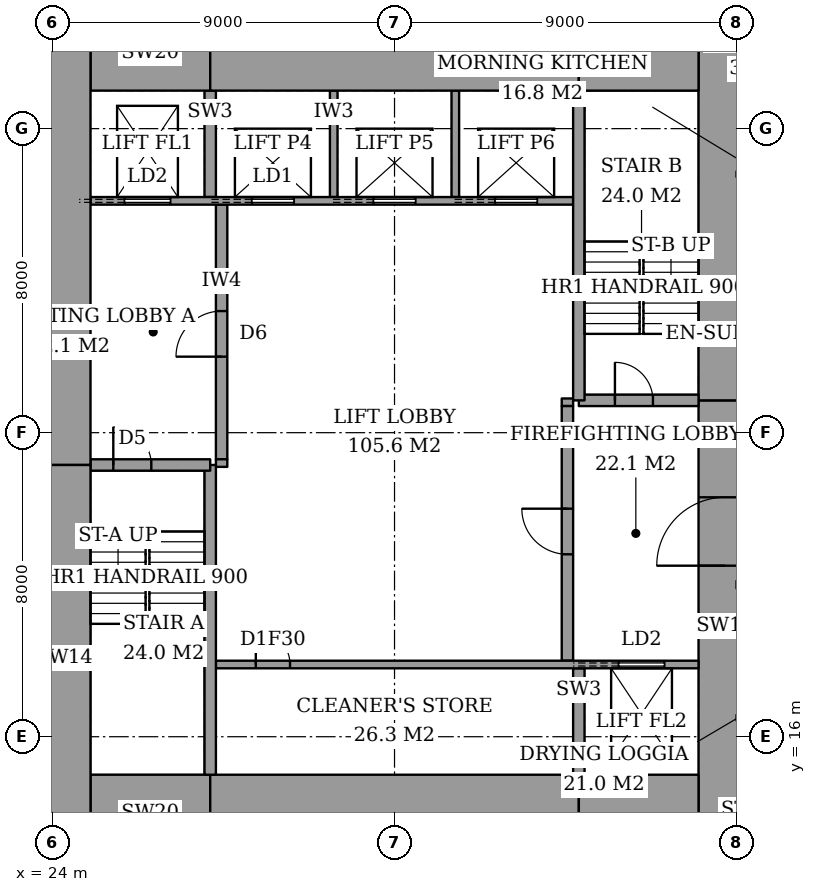
"""IFC4 building model, lengths in metres.
Left out: names, types, materials, properties, quantities, classifications, styles, units other than length and angle.
Written with IfcOpenShell. Run it as: python <this file> out.ifc"""

import sys

from ifc_helpers import new_model, si_unit, direction, frame, frame_2d, origin, place, context, subcontext, project, spatial, rectangle, extrude, element, fill, save


model = new_model("IFC4")
c1 = context("Model", 3, precision=1e-05, world=origin(), true_north=direction((0.0, 1.0)))
c2 = subcontext(c1, "Body", "Model", "MODEL_VIEW")
j1 = project(units=[si_unit("LENGTHUNIT", "METRE"), si_unit("PLANEANGLEUNIT", "RADIAN")], contexts=[c1])
p1 = place(None, origin())
s1 = spatial("IfcSite", under=j1, at=p1, CompositionType="ELEMENT")
p2 = place(p1, origin())
s2 = spatial("IfcBuilding", under=s1, at=p2, CompositionType="ELEMENT")
p3 = place(p2, frame((0.0, 0.0, 244.8)))
s3 = spatial("IfcBuildingStorey", under=s2, at=p3, CompositionType="ELEMENT", Elevation=244.8)
p4 = place(p3, frame((25.0, 14.0, 0.0), z_axis=(0.0, 0.0, 1.0), x_axis=(1.0, 0.0, 0.0)))
e1 = element("IfcWall", 1, at=p4, inside=s3, PredefinedType="SHEAR", context=c2, shape_type="SweptSolid", body=[
    extrude(rectangle(XDim=3.15, YDim=2.0, at=frame_2d((1.575, 0.0))), origin(), (0.0, 0.0, 1.0), 3.6),
])
p5 = place(p3, frame((28.15, 14.0, 0.0), z_axis=(0.0, 0.0, 1.0), x_axis=(1.0, 0.0, 0.0)))
e2 = element("IfcWall", 2, at=p5, inside=s3, PredefinedType="SHEAR", context=c2, shape_type="SweptSolid", body=[
    extrude(rectangle(XDim=9.7, YDim=2.0, at=frame_2d((4.85, 0.0))), origin(), (0.0, 0.0, 1.0), 3.6),
])
for number, where, z_axis, x_axis in (
    (3, (37.85, 14.0, 0.0), (0.0, 0.0, 1.0), (1.0, 0.0, 0.0)),
    (4, (25.0, 34.0, 0.0), (0.0, 0.0, 1.0), (1.0, 0.0, 0.0)),
):
    element("IfcWall", number, at=place(p3, frame(where, z_axis=z_axis, x_axis=x_axis)), inside=s3, PredefinedType="SHEAR", context=c2, shape_type="SweptSolid", body=[
        extrude(rectangle(XDim=3.15, YDim=2.0, at=frame_2d((1.575, 0.0))), origin(), (0.0, 0.0, 1.0), 3.6),
    ])
p6 = place(p3, frame((28.15, 34.0, 0.0), z_axis=(0.0, 0.0, 1.0), x_axis=(1.0, 0.0, 0.0)))
e5 = element("IfcWall", 5, at=p6, inside=s3, PredefinedType="SHEAR", context=c2, shape_type="SweptSolid", body=[
    extrude(rectangle(XDim=9.7, YDim=2.0, at=frame_2d((4.85, 0.0))), origin(), (0.0, 0.0, 1.0), 3.6),
])
p7 = place(p3, frame((37.85, 34.0, 0.0), z_axis=(0.0, 0.0, 1.0), x_axis=(1.0, 0.0, 0.0)))
e6 = element("IfcWall", 6, at=p7, inside=s3, PredefinedType="SHEAR", context=c2, shape_type="SweptSolid", body=[
    extrude(rectangle(XDim=3.15, YDim=2.0, at=frame_2d((1.575, 0.0))), origin(), (0.0, 0.0, 1.0), 3.6),
])
p8 = place(p3, frame((24.3, 13.0, 0.0), z_axis=(0.0, 0.0, 1.0), x_axis=(0.0, 1.0, 0.0)))
e7 = element("IfcWall", 7, at=p8, inside=s3, PredefinedType="SHEAR", context=c2, shape_type="SweptSolid", body=[
    extrude(rectangle(XDim=10.15, YDim=1.4, at=frame_2d((5.075, 0.0))), origin(), (0.0, 0.0, 1.0), 3.6),
])
p9 = place(p3, frame((24.3, 23.15, 0.0), z_axis=(0.0, 0.0, 1.0), x_axis=(0.0, 1.0, 0.0)))
e8 = element("IfcWall", 8, at=p9, inside=s3, PredefinedType="SHEAR", context=c2, shape_type="SweptSolid", body=[
    extrude(rectangle(XDim=11.85, YDim=1.4, at=frame_2d((5.925, 0.0))), origin(), (0.0, 0.0, 1.0), 3.6),
])
p10 = place(p3, frame((41.7, 13.0, 0.0), z_axis=(0.0, 0.0, 1.0), x_axis=(0.0, 1.0, 0.0)))
e9 = element("IfcWall", 9, at=p10, inside=s3, PredefinedType="SHEAR", context=c2, shape_type="SweptSolid", body=[
    extrude(rectangle(XDim=11.85, YDim=1.4, at=frame_2d((5.925, 0.0))), origin(), (0.0, 0.0, 1.0), 3.6),
])
p11 = place(p10, frame((7.5, 0.0, 0.0)))
e10 = element("IfcOpeningElement", 10, at=p11, cuts=e9, PredefinedType="OPENING", context=c2, shape_type="SweptSolid", body=[
    extrude(rectangle(XDim=1.8, YDim=2.4, at=frame_2d((0.9, 1.2))), frame((0.0, 0.71, 0.0), z_axis=(0.0, -1.0, 0.0), x_axis=(1.0, 0.0, 0.0)), (0.0, 0.0, 1.0), 1.42),
])
p12 = place(p3, frame((41.7, 24.85, 0.0), z_axis=(0.0, 0.0, 1.0), x_axis=(0.0, 1.0, 0.0)))
e11 = element("IfcWall", 11, at=p12, inside=s3, PredefinedType="SHEAR", context=c2, shape_type="SweptSolid", body=[
    extrude(rectangle(XDim=10.15, YDim=1.4, at=frame_2d((5.075, 0.0))), origin(), (0.0, 0.0, 1.0), 3.6),
])
p13 = place(p3, frame((28.15, 15.0, 0.0), z_axis=(0.0, 0.0, 1.0), x_axis=(0.0, 1.0, 0.0)))
e12 = element("IfcWall", 12, at=p13, inside=s3, PredefinedType="SHEAR", context=c2, shape_type="SweptSolid", body=[
    extrude(rectangle(XDim=8.15, YDim=0.3, at=frame_2d((4.075, 0.0))), origin(), (0.0, 0.0, 1.0), 3.6),
])
p14 = place(p3, frame((25.0, 23.15, 0.0), z_axis=(0.0, 0.0, 1.0), x_axis=(1.0, 0.0, 0.0)))
e13 = element("IfcWall", 13, at=p14, inside=s3, PredefinedType="SHEAR", context=c2, shape_type="SweptSolid", body=[
    extrude(rectangle(XDim=3.15, YDim=0.3, at=frame_2d((1.575, 0.0))), origin(), (0.0, 0.0, 1.0), 3.6),
])
p15 = place(p14, frame((0.6, 0.0, 0.0)))
e14 = element("IfcOpeningElement", 14, at=p15, cuts=e13, PredefinedType="OPENING", context=c2, shape_type="SweptSolid", body=[
    extrude(rectangle(XDim=1.0, YDim=2.1, at=frame_2d((0.5, 1.05))), frame((0.0, 0.16, 0.0), z_axis=(0.0, -1.0, 0.0), x_axis=(1.0, 0.0, 0.0)), (0.0, 0.0, 1.0), 0.32),
])
p16 = place(p3, frame((37.85, 24.85, 0.0), z_axis=(0.0, 0.0, 1.0), x_axis=(0.0, 1.0, 0.0)))
e15 = element("IfcWall", 15, at=p16, inside=s3, PredefinedType="SHEAR", context=c2, shape_type="SweptSolid", body=[
    extrude(rectangle(XDim=8.15, YDim=0.3, at=frame_2d((4.075, 0.0))), origin(), (0.0, 0.0, 1.0), 3.6),
])
p17 = place(p3, frame((37.85, 24.85, 0.0), z_axis=(0.0, 0.0, 1.0), x_axis=(1.0, 0.0, 0.0)))
e16 = element("IfcWall", 16, at=p17, inside=s3, PredefinedType="SHEAR", context=c2, shape_type="SweptSolid", body=[
    extrude(rectangle(XDim=3.15, YDim=0.3, at=frame_2d((1.575, 0.0))), origin(), (0.0, 0.0, 1.0), 3.6),
])
p18 = place(p17, frame((0.95, 0.0, 0.0)))
e17 = element("IfcOpeningElement", 17, at=p18, cuts=e16, PredefinedType="OPENING", context=c2, shape_type="SweptSolid", body=[
    extrude(rectangle(XDim=1.0, YDim=2.1, at=frame_2d((0.5, 1.05))), frame((0.0, 0.16, 0.0), z_axis=(0.0, -1.0, 0.0), x_axis=(1.0, 0.0, 0.0)), (0.0, 0.0, 1.0), 0.32),
])
p19 = place(p3, frame((28.45, 23.3, 0.0), z_axis=(0.0, 0.0, 1.0), x_axis=(0.0, 1.0, 0.0)))
e18 = element("IfcWall", 18, at=p19, inside=s3, PredefinedType="PARTITIONING", context=c2, shape_type="SweptSolid", body=[
    extrude(rectangle(XDim=6.7, YDim=0.3, at=frame_2d((3.35, 0.0))), origin(), (0.0, 0.0, 1.0), 3.6),
])
p20 = place(p19, frame((2.7, 0.0, 0.0)))
e19 = element("IfcOpeningElement", 19, at=p20, cuts=e18, PredefinedType="OPENING", context=c2, shape_type="SweptSolid", body=[
    extrude(rectangle(XDim=1.2, YDim=2.1, at=frame_2d((0.6, 1.05))), frame((0.0, 0.16, 0.0), z_axis=(0.0, -1.0, 0.0), x_axis=(1.0, 0.0, 0.0)), (0.0, 0.0, 1.0), 0.32),
])
p21 = place(p3, frame((37.55, 18.0, 0.0), z_axis=(0.0, 0.0, 1.0), x_axis=(0.0, 1.0, 0.0)))
e20 = element("IfcWall", 20, at=p21, inside=s3, PredefinedType="PARTITIONING", context=c2, shape_type="SweptSolid", body=[
    extrude(rectangle(XDim=6.7, YDim=0.3, at=frame_2d((3.35, 0.0))), origin(), (0.0, 0.0, 1.0), 3.6),
])
p22 = place(p21, frame((2.8, 0.0, 0.0)))
e21 = element("IfcOpeningElement", 21, at=p22, cuts=e20, PredefinedType="OPENING", context=c2, shape_type="SweptSolid", body=[
    extrude(rectangle(XDim=1.2, YDim=2.1, at=frame_2d((0.6, 1.05))), frame((0.0, 0.16, 0.0), z_axis=(0.0, -1.0, 0.0), x_axis=(1.0, 0.0, 0.0)), (0.0, 0.0, 1.0), 0.32),
])
p23 = place(p3, frame((28.3, 17.9, 0.0), z_axis=(0.0, 0.0, 1.0), x_axis=(1.0, 0.0, 0.0)))
e22 = element("IfcWall", 22, at=p23, inside=s3, PredefinedType="PARTITIONING", context=c2, shape_type="SweptSolid", body=[
    extrude(rectangle(XDim=12.7, YDim=0.2, at=frame_2d((6.35, 0.0))), origin(), (0.0, 0.0, 1.0), 3.6),
])
p24 = place(p23, frame((1.05, 0.0, 0.0)))
e23 = element("IfcOpeningElement", 23, at=p24, cuts=e22, PredefinedType="OPENING", context=c2, shape_type="SweptSolid", body=[
    extrude(rectangle(XDim=0.9, YDim=2.1, at=frame_2d((0.45, 1.05))), frame((0.0, 0.11, 0.0), z_axis=(0.0, -1.0, 0.0), x_axis=(1.0, 0.0, 0.0)), (0.0, 0.0, 1.0), 0.22),
])
p25 = place(p23, frame((10.6, 0.0, 0.0)))
e24 = element("IfcOpeningElement", 24, at=p25, cuts=e22, PredefinedType="OPENING", context=c2, shape_type="SweptSolid", body=[
    extrude(rectangle(XDim=1.2, YDim=2.1, at=frame_2d((0.6, 1.05))), frame((0.0, 0.11, 0.0), z_axis=(0.0, -1.0, 0.0), x_axis=(1.0, 0.0, 0.0)), (0.0, 0.0, 1.0), 0.22),
])
p26 = place(p3, frame((25.0, 30.1, 0.0), z_axis=(0.0, 0.0, 1.0), x_axis=(1.0, 0.0, 0.0)))
e25 = element("IfcWall", 25, at=p26, inside=s3, PredefinedType="PARTITIONING", context=c2, shape_type="SweptSolid", body=[
    extrude(rectangle(XDim=12.7, YDim=0.2, at=frame_2d((6.35, 0.0))), origin(), (0.0, 0.0, 1.0), 3.6),
])
p27 = place(p26, frame((4.25, 0.0, 0.0)))
e26 = element("IfcOpeningElement", 26, at=p27, cuts=e25, PredefinedType="OPENING", context=c2, shape_type="SweptSolid", body=[
    extrude(rectangle(XDim=1.1, YDim=2.1, at=frame_2d((0.55, 1.05))), frame((0.0, 0.11, 0.0), z_axis=(0.0, -1.0, 0.0), x_axis=(1.0, 0.0, 0.0)), (0.0, 0.0, 1.0), 0.22),
])
p28 = place(p26, frame((7.45, 0.0, 0.0)))
e27 = element("IfcOpeningElement", 27, at=p28, cuts=e25, PredefinedType="OPENING", context=c2, shape_type="SweptSolid", body=[
    extrude(rectangle(XDim=1.1, YDim=2.1, at=frame_2d((0.55, 1.05))), frame((0.0, 0.11, 0.0), z_axis=(0.0, -1.0, 0.0), x_axis=(1.0, 0.0, 0.0)), (0.0, 0.0, 1.0), 0.22),
])
p29 = place(p26, frame((10.65, 0.0, 0.0)))
e28 = element("IfcOpeningElement", 28, at=p29, cuts=e25, PredefinedType="OPENING", context=c2, shape_type="SweptSolid", body=[
    extrude(rectangle(XDim=1.1, YDim=2.1, at=frame_2d((0.55, 1.05))), frame((0.0, 0.11, 0.0), z_axis=(0.0, -1.0, 0.0), x_axis=(1.0, 0.0, 0.0)), (0.0, 0.0, 1.0), 0.22),
])
p30 = place(p26, frame((0.9, 0.0, 0.0)))
e29 = element("IfcOpeningElement", 29, at=p30, cuts=e25, PredefinedType="OPENING", context=c2, shape_type="SweptSolid", body=[
    extrude(rectangle(XDim=1.2, YDim=2.1, at=frame_2d((0.6, 1.05))), frame((0.0, 0.11, 0.0), z_axis=(0.0, -1.0, 0.0), x_axis=(1.0, 0.0, 0.0)), (0.0, 0.0, 1.0), 0.22),
])
p31 = place(p3, frame((37.85, 15.0, 0.0), z_axis=(0.0, 0.0, 1.0), x_axis=(0.0, 1.0, 0.0)))
e30 = element("IfcWall", 30, at=p31, inside=s3, PredefinedType="SHEAR", context=c2, shape_type="SweptSolid", body=[
    extrude(rectangle(XDim=2.8, YDim=0.3, at=frame_2d((1.4, 0.0))), origin(), (0.0, 0.0, 1.0), 3.6),
])
for number, where, z_axis, x_axis in (
    (31, (31.4, 30.2, 0.0), (0.0, 0.0, 1.0), (0.0, 1.0, 0.0)),
    (32, (34.6, 30.2, 0.0), (0.0, 0.0, 1.0), (0.0, 1.0, 0.0)),
):
    element("IfcWall", number, at=place(p3, frame(where, z_axis=z_axis, x_axis=x_axis)), inside=s3, PredefinedType="PARTITIONING", context=c2, shape_type="SweptSolid", body=[
        extrude(rectangle(XDim=2.8, YDim=0.2, at=frame_2d((1.4, 0.0))), origin(), (0.0, 0.0, 1.0), 3.6),
    ])
p32 = place(p3, frame((28.15, 30.2, 0.0), z_axis=(0.0, 0.0, 1.0), x_axis=(0.0, 1.0, 0.0)))
e33 = element("IfcWall", 33, at=p32, inside=s3, PredefinedType="SHEAR", context=c2, shape_type="SweptSolid", body=[
    extrude(rectangle(XDim=2.8, YDim=0.3, at=frame_2d((1.4, 0.0))), origin(), (0.0, 0.0, 1.0), 3.6),
])
for number, where, z_axis, x_axis in (
    (34, (28.3, 23.2, 0.0), (0.0, 0.0, 1.0), (1.0, 0.0, 0.0)),
    (35, (37.4, 24.8, 0.0), (0.0, 0.0, 1.0), (1.0, 0.0, 0.0)),
):
    element("IfcWall", number, at=place(p3, frame(where, z_axis=z_axis, x_axis=x_axis)), inside=s3, PredefinedType="PARTITIONING", context=c2, shape_type="SweptSolid", body=[
        extrude(rectangle(XDim=0.3, YDim=0.2, at=frame_2d((0.15, 0.0))), origin(), (0.0, 0.0, 1.0), 3.6),
    ])
p33 = place(p15, origin())
e36 = element("IfcDoor", 36, at=p33, inside=s3, OperationType="SINGLE_SWING_RIGHT", PredefinedType="DOOR", context=c2, shape_type="SweptSolid", body=[
    extrude(rectangle(XDim=1.0, YDim=2.1, at=frame_2d((0.5, 1.05))), frame((0.0, 0.025, 0.0), z_axis=(0.0, -1.0, 0.0), x_axis=(1.0, 0.0, 0.0)), (0.0, 0.0, 1.0), 0.05),
])
fill(e14, e36)
p34 = place(p18, origin())
e37 = element("IfcDoor", 37, at=p34, inside=s3, OperationType="SINGLE_SWING_RIGHT", PredefinedType="DOOR", context=c2, shape_type="SweptSolid", body=[
    extrude(rectangle(XDim=1.0, YDim=2.1, at=frame_2d((0.5, 1.05))), frame((0.0, 0.025, 0.0), z_axis=(0.0, -1.0, 0.0), x_axis=(1.0, 0.0, 0.0)), (0.0, 0.0, 1.0), 0.05),
])
fill(e17, e37)
p35 = place(p20, origin())
e38 = element("IfcDoor", 38, at=p35, inside=s3, OperationType="SINGLE_SWING_RIGHT", PredefinedType="DOOR", context=c2, shape_type="SweptSolid", body=[
    extrude(rectangle(XDim=1.2, YDim=2.1, at=frame_2d((0.6, 1.05))), frame((0.0, 0.025, 0.0), z_axis=(0.0, -1.0, 0.0), x_axis=(1.0, 0.0, 0.0)), (0.0, 0.0, 1.0), 0.05),
])
fill(e19, e38)
p36 = place(p22, origin())
e39 = element("IfcDoor", 39, at=p36, inside=s3, OperationType="SINGLE_SWING_LEFT", PredefinedType="DOOR", context=c2, shape_type="SweptSolid", body=[
    extrude(rectangle(XDim=1.2, YDim=2.1, at=frame_2d((0.6, 1.05))), frame((0.0, 0.025, 0.0), z_axis=(0.0, -1.0, 0.0), x_axis=(1.0, 0.0, 0.0)), (0.0, 0.0, 1.0), 0.05),
])
fill(e21, e39)
p37 = place(p11, origin())
e40 = element("IfcDoor", 40, at=p37, inside=s3, OperationType="DOUBLE_DOOR_DOUBLE_SWING", PredefinedType="DOOR", context=c2, shape_type="SweptSolid", body=[
    extrude(rectangle(XDim=1.8, YDim=2.4, at=frame_2d((0.9, 1.2))), frame((0.0, 0.025, 0.0), z_axis=(0.0, -1.0, 0.0), x_axis=(1.0, 0.0, 0.0)), (0.0, 0.0, 1.0), 0.05),
])
fill(e10, e40)
p38 = place(p24, origin())
e41 = element("IfcDoor", 41, at=p38, inside=s3, OperationType="SINGLE_SWING_RIGHT", PredefinedType="DOOR", context=c2, shape_type="SweptSolid", body=[
    extrude(rectangle(XDim=0.9, YDim=2.1, at=frame_2d((0.45, 1.05))), frame((0.0, 0.025, 0.0), z_axis=(0.0, -1.0, 0.0), x_axis=(1.0, 0.0, 0.0)), (0.0, 0.0, 1.0), 0.05),
])
fill(e23, e41)
p39 = place(p27, origin())
e42 = element("IfcDoor", 42, at=p39, inside=s3, OperationType="SLIDING_TO_LEFT", PredefinedType="DOOR", context=c2, shape_type="SweptSolid", body=[
    extrude(rectangle(XDim=1.1, YDim=2.1, at=frame_2d((0.55, 1.05))), frame((0.0, 0.025, 0.0), z_axis=(0.0, -1.0, 0.0), x_axis=(1.0, 0.0, 0.0)), (0.0, 0.0, 1.0), 0.05),
])
fill(e26, e42)
p40 = place(p28, origin())
e43 = element("IfcDoor", 43, at=p40, inside=s3, OperationType="SLIDING_TO_LEFT", PredefinedType="DOOR", context=c2, shape_type="SweptSolid", body=[
    extrude(rectangle(XDim=1.1, YDim=2.1, at=frame_2d((0.55, 1.05))), frame((0.0, 0.025, 0.0), z_axis=(0.0, -1.0, 0.0), x_axis=(1.0, 0.0, 0.0)), (0.0, 0.0, 1.0), 0.05),
])
fill(e27, e43)
p41 = place(p29, origin())
e44 = element("IfcDoor", 44, at=p41, inside=s3, OperationType="SLIDING_TO_LEFT", PredefinedType="DOOR", context=c2, shape_type="SweptSolid", body=[
    extrude(rectangle(XDim=1.1, YDim=2.1, at=frame_2d((0.55, 1.05))), frame((0.0, 0.025, 0.0), z_axis=(0.0, -1.0, 0.0), x_axis=(1.0, 0.0, 0.0)), (0.0, 0.0, 1.0), 0.05),
])
fill(e28, e44)
p42 = place(p30, origin())
e45 = element("IfcDoor", 45, at=p42, inside=s3, OperationType="SLIDING_TO_LEFT", PredefinedType="DOOR", context=c2, shape_type="SweptSolid", body=[
    extrude(rectangle(XDim=1.2, YDim=2.1, at=frame_2d((0.6, 1.05))), frame((0.0, 0.025, 0.0), z_axis=(0.0, -1.0, 0.0), x_axis=(1.0, 0.0, 0.0)), (0.0, 0.0, 1.0), 0.05),
])
fill(e29, e45)
p43 = place(p25, origin())
e46 = element("IfcDoor", 46, at=p43, inside=s3, OperationType="SLIDING_TO_LEFT", PredefinedType="DOOR", context=c2, shape_type="SweptSolid", body=[
    extrude(rectangle(XDim=1.2, YDim=2.1, at=frame_2d((0.6, 1.05))), frame((0.0, 0.025, 0.0), z_axis=(0.0, -1.0, 0.0), x_axis=(1.0, 0.0, 0.0)), (0.0, 0.0, 1.0), 0.05),
])
fill(e24, e46)
save(model, sys.argv[1])
